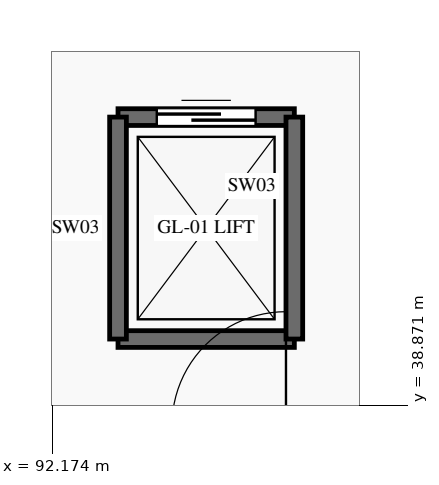
"""IFC4 building model, lengths in metres.
Left out: names, types, materials, properties, quantities, classifications, styles, units other than length and angle.
Written with IfcOpenShell. Run it as: python <this file> out.ifc"""

import sys

from ifc_helpers import new_model, si_unit, direction, frame, frame_2d, origin, place, context, subcontext, project, spatial, rectangle, extrude, element, fill, save


model = new_model("IFC4")
c1 = context("Model", 3, precision=1e-05, world=origin(), true_north=direction((0.0, 1.0)))
c2 = subcontext(c1, "Body", "Model", "MODEL_VIEW")
j1 = project(units=[si_unit("LENGTHUNIT", "METRE"), si_unit("PLANEANGLEUNIT", "RADIAN")], contexts=[c1])
p1 = place(None, origin())
s1 = spatial("IfcSite", under=j1, at=p1, CompositionType="ELEMENT")
p2 = place(p1, origin())
s2 = spatial("IfcBuilding", under=s1, at=p2, CompositionType="ELEMENT")
p3 = place(p2, frame((0.0, 0.0, -4.5)))
s3 = spatial("IfcBuildingStorey", under=s2, at=p3, CompositionType="ELEMENT", Elevation=-4.5)
p4 = place(p3, frame((93.04, 39.74, 0.0), z_axis=(0.0, 0.0, 1.0), x_axis=(1.0, 0.0, 0.0)))
e1 = element("IfcWall", 1, at=p4, inside=s3, PredefinedType="SHEAR", context=c2, shape_type="SweptSolid", body=[
    extrude(rectangle(XDim=2.32, YDim=0.22, at=frame_2d((1.16, 0.0))), origin(), (0.0, 0.0, 1.0), 4.5),
])
p5 = place(p3, frame((93.04, 42.66, 0.0), z_axis=(0.0, 0.0, 1.0), x_axis=(1.0, 0.0, 0.0)))
e2 = element("IfcWall", 2, at=p5, inside=s3, PredefinedType="SHEAR", context=c2, shape_type="SweptSolid", body=[
    extrude(rectangle(XDim=2.32, YDim=0.22, at=frame_2d((1.16, 0.0))), origin(), (0.0, 0.0, 1.0), 4.5),
])
p6 = place(p5, frame((0.51, 0.0, 0.0)))
e3 = element("IfcOpeningElement", 3, at=p6, cuts=e2, PredefinedType="OPENING", context=c2, shape_type="SweptSolid", body=[
    extrude(rectangle(XDim=1.3, YDim=2.25, at=frame_2d((0.65, 1.125))), frame((0.0, 0.125, 0.0), z_axis=(0.0, -1.0, 0.0), x_axis=(1.0, 0.0, 0.0)), (0.0, 0.0, 1.0), 0.25),
])
for number, where, z_axis, x_axis in (
    (4, (93.04, 39.74, 0.0), (0.0, 0.0, 1.0), (0.0, 1.0, 0.0)),
    (5, (95.36, 39.74, 0.0), (0.0, 0.0, 1.0), (0.0, 1.0, 0.0)),
):
    element("IfcWall", number, at=place(p3, frame(where, z_axis=z_axis, x_axis=x_axis)), inside=s3, PredefinedType="SHEAR", context=c2, shape_type="SweptSolid", body=[
        extrude(rectangle(XDim=2.92, YDim=0.22, at=frame_2d((1.46, 0.0))), origin(), (0.0, 0.0, 1.0), 4.5),
    ])
p7 = place(p6, origin())
e6 = element("IfcDoor", 6, at=p7, inside=s3, OperationType="SLIDING_TO_RIGHT", PredefinedType="DOOR", context=c2, shape_type="SweptSolid", body=[
    extrude(rectangle(XDim=1.3, YDim=2.25, at=frame_2d((0.65, 1.125))), frame((0.0, 0.025, 0.0), z_axis=(0.0, -1.0, 0.0), x_axis=(1.0, 0.0, 0.0)), (0.0, 0.0, 1.0), 0.05),
])
fill(e3, e6)
save(model, sys.argv[1])
